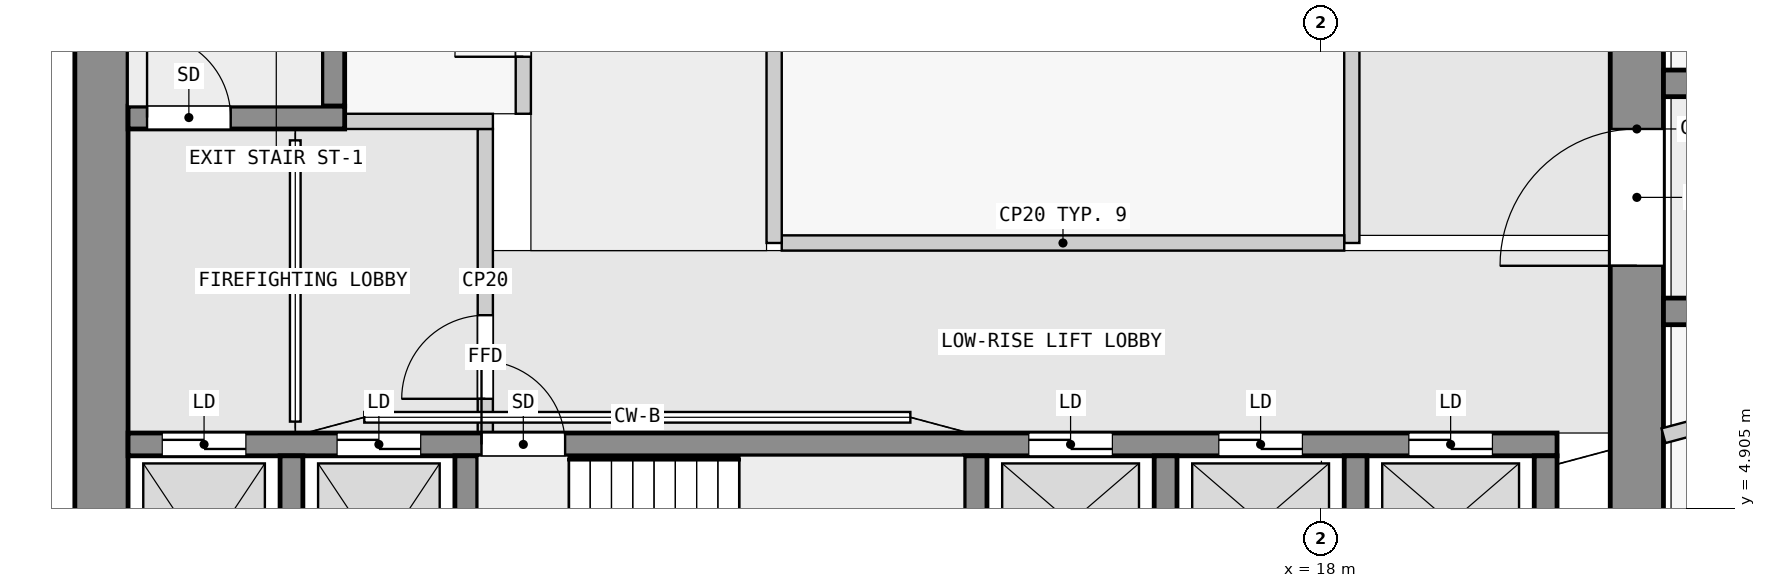
"""IFC4 building model, lengths in metres.
Left out: names, types, materials, properties, quantities, classifications, styles, units other than length and angle.
Written with IfcOpenShell. Run it as: python <this file> out.ifc"""

import sys

from ifc_helpers import new_model, si_unit, direction, frame, frame_2d, origin, place, context, subcontext, project, spatial, rectangle, extrude, element, fill, save


model = new_model("IFC4")
c1 = context("Model", 3, precision=1e-05, world=origin(), true_north=direction((0.0, 1.0)))
c2 = subcontext(c1, "Body", "Model", "MODEL_VIEW")
j1 = project(units=[si_unit("LENGTHUNIT", "METRE"), si_unit("PLANEANGLEUNIT", "RADIAN")], contexts=[c1])
p1 = place(None, origin())
s1 = spatial("IfcSite", under=j1, at=p1, CompositionType="ELEMENT")
p2 = place(p1, origin())
s2 = spatial("IfcBuilding", under=s1, at=p2, CompositionType="ELEMENT")
p3 = place(p2, frame((0.0, 0.0, 72.3)))
s3 = spatial("IfcBuildingStorey", under=s2, at=p3, CompositionType="ELEMENT", Elevation=72.3)
p4 = place(p3, frame((1.95, 2.5, 0.0), z_axis=(0.0, 0.0, 1.0), x_axis=(0.0, 1.0, 0.0)))
e1 = element("IfcWall", 1, at=p4, inside=s3, PredefinedType="SHEAR", context=c2, shape_type="SweptSolid", body=[
    extrude(rectangle(XDim=14.8, YDim=0.7, at=frame_2d((7.4, 0.0))), origin(), (0.0, 0.0, 1.0), 5.75),
])
p5 = place(p3, frame((22.15, 2.5, 0.0), z_axis=(0.0, 0.0, 1.0), x_axis=(0.0, 1.0, 0.0)))
e2 = element("IfcWall", 2, at=p5, inside=s3, PredefinedType="SHEAR", context=c2, shape_type="SweptSolid", body=[
    extrude(rectangle(XDim=14.8, YDim=0.7, at=frame_2d((7.4, 0.0))), origin(), (0.0, 0.0, 1.0), 5.75),
])
p6 = place(p5, frame((5.6, 0.0, 0.0)))
e3 = element("IfcOpeningElement", 3, at=p6, cuts=e2, PredefinedType="OPENING", context=c2, shape_type="SweptSolid", body=[
    extrude(rectangle(XDim=1.8, YDim=2.1, at=frame_2d((0.9, 1.05))), frame((0.0, 0.36, 0.0), z_axis=(0.0, -1.0, 0.0), x_axis=(1.0, 0.0, 0.0)), (0.0, 0.0, 1.0), 0.72),
])
for number, where, z_axis, x_axis in (
    (4, (4.45, 2.8, 0.0), (0.0, 0.0, 1.0), (0.0, 1.0, 0.0)),
    (5, (6.75, 2.8, 0.0), (0.0, 0.0, 1.0), (0.0, 1.0, 0.0)),
    (6, (13.45, 2.8, 0.0), (0.0, 0.0, 1.0), (0.0, 1.0, 0.0)),
    (7, (15.95, 2.8, 0.0), (0.0, 0.0, 1.0), (0.0, 1.0, 0.0)),
    (8, (18.45, 2.8, 0.0), (0.0, 0.0, 1.0), (0.0, 1.0, 0.0)),
    (9, (20.95, 2.8, 0.0), (0.0, 0.0, 1.0), (0.0, 1.0, 0.0)),
):
    element("IfcWall", number, at=place(p3, frame(where, z_axis=z_axis, x_axis=x_axis)), inside=s3, PredefinedType="SHEAR", context=c2, shape_type="SweptSolid", body=[
        extrude(rectangle(XDim=2.8, YDim=0.3, at=frame_2d((1.4, 0.0))), origin(), (0.0, 0.0, 1.0), 5.75),
    ])
p7 = place(p3, frame((2.3, 5.75, 0.0), z_axis=(0.0, 0.0, 1.0), x_axis=(1.0, 0.0, 0.0)))
e10 = element("IfcWall", 10, at=p7, inside=s3, PredefinedType="SHEAR", context=c2, shape_type="SweptSolid", body=[
    extrude(rectangle(XDim=18.8, YDim=0.3, at=frame_2d((9.4, 0.0))), origin(), (0.0, 0.0, 1.0), 5.75),
])
p8 = place(p7, frame((4.65, 0.0, 0.0)))
e11 = element("IfcOpeningElement", 11, at=p8, cuts=e10, PredefinedType="OPENING", context=c2, shape_type="SweptSolid", body=[
    extrude(rectangle(XDim=1.1, YDim=2.1, at=frame_2d((0.55, 1.05))), frame((0.0, 0.16, 0.0), z_axis=(0.0, -1.0, 0.0), x_axis=(1.0, 0.0, 0.0)), (0.0, 0.0, 1.0), 0.32),
])
p9 = place(p7, frame((0.45, 0.0, 0.0)))
e12 = element("IfcOpeningElement", 12, at=p9, cuts=e10, PredefinedType="OPENING", context=c2, shape_type="SweptSolid", body=[
    extrude(rectangle(XDim=1.1, YDim=2.1, at=frame_2d((0.55, 1.05))), frame((0.0, 0.16, 0.0), z_axis=(0.0, -1.0, 0.0), x_axis=(1.0, 0.0, 0.0)), (0.0, 0.0, 1.0), 0.32),
])
p10 = place(p7, frame((2.75, 0.0, 0.0)))
e13 = element("IfcOpeningElement", 13, at=p10, cuts=e10, PredefinedType="OPENING", context=c2, shape_type="SweptSolid", body=[
    extrude(rectangle(XDim=1.1, YDim=2.1, at=frame_2d((0.55, 1.05))), frame((0.0, 0.16, 0.0), z_axis=(0.0, -1.0, 0.0), x_axis=(1.0, 0.0, 0.0)), (0.0, 0.0, 1.0), 0.32),
])
p11 = place(p7, frame((11.85, 0.0, 0.0)))
e14 = element("IfcOpeningElement", 14, at=p11, cuts=e10, PredefinedType="OPENING", context=c2, shape_type="SweptSolid", body=[
    extrude(rectangle(XDim=1.1, YDim=2.1, at=frame_2d((0.55, 1.05))), frame((0.0, 0.16, 0.0), z_axis=(0.0, -1.0, 0.0), x_axis=(1.0, 0.0, 0.0)), (0.0, 0.0, 1.0), 0.32),
])
p12 = place(p7, frame((14.35, 0.0, 0.0)))
e15 = element("IfcOpeningElement", 15, at=p12, cuts=e10, PredefinedType="OPENING", context=c2, shape_type="SweptSolid", body=[
    extrude(rectangle(XDim=1.1, YDim=2.1, at=frame_2d((0.55, 1.05))), frame((0.0, 0.16, 0.0), z_axis=(0.0, -1.0, 0.0), x_axis=(1.0, 0.0, 0.0)), (0.0, 0.0, 1.0), 0.32),
])
p13 = place(p7, frame((16.85, 0.0, 0.0)))
e16 = element("IfcOpeningElement", 16, at=p13, cuts=e10, PredefinedType="OPENING", context=c2, shape_type="SweptSolid", body=[
    extrude(rectangle(XDim=1.1, YDim=2.1, at=frame_2d((0.55, 1.05))), frame((0.0, 0.16, 0.0), z_axis=(0.0, -1.0, 0.0), x_axis=(1.0, 0.0, 0.0)), (0.0, 0.0, 1.0), 0.32),
])
p14 = place(p3, frame((2.3, 10.05, 0.0), z_axis=(0.0, 0.0, 1.0), x_axis=(1.0, 0.0, 0.0)))
e17 = element("IfcWall", 17, at=p14, inside=s3, PredefinedType="SHEAR", context=c2, shape_type="SweptSolid", body=[
    extrude(rectangle(XDim=2.85, YDim=0.3, at=frame_2d((1.425, 0.0))), origin(), (0.0, 0.0, 1.0), 5.75),
])
p15 = place(p14, frame((0.25, 0.0, 0.0)))
e18 = element("IfcOpeningElement", 18, at=p15, cuts=e17, PredefinedType="OPENING", context=c2, shape_type="SweptSolid", body=[
    extrude(rectangle(XDim=1.1, YDim=2.1, at=frame_2d((0.55, 1.05))), frame((0.0, 0.16, 0.0), z_axis=(0.0, -1.0, 0.0), x_axis=(1.0, 0.0, 0.0)), (0.0, 0.0, 1.0), 0.32),
])
p16 = place(p3, frame((5.0, 10.2, 0.0), z_axis=(0.0, 0.0, 1.0), x_axis=(0.0, 1.0, 0.0)))
e19 = element("IfcWall", 19, at=p16, inside=s3, PredefinedType="SHEAR", context=c2, shape_type="SweptSolid", body=[
    extrude(rectangle(XDim=6.4, YDim=0.3, at=frame_2d((3.2, 0.0))), origin(), (0.0, 0.0, 1.0), 5.75),
])
p17 = place(p3, frame((22.5, 7.5, 0.0), z_axis=(0.0, 0.0, 1.0), x_axis=(1.0, 0.0, 0.0)))
e20 = element("IfcWall", 20, at=p17, inside=s3, PredefinedType="SHEAR", context=c2, shape_type="SweptSolid", body=[
    extrude(rectangle(XDim=22.5, YDim=0.35, at=frame_2d((11.25, 0.0))), origin(), (0.0, 0.0, 1.0), 5.75),
])
p18 = place(p17, frame((20.1, 0.0, 0.0)))
e21 = element("IfcOpeningElement", 21, at=p18, cuts=e20, PredefinedType="OPENING", context=c2, shape_type="SweptSolid", body=[
    extrude(rectangle(XDim=1.8, YDim=2.1, at=frame_2d((0.9, 1.05))), frame((0.0, 0.185, 0.0), z_axis=(0.0, -1.0, 0.0), x_axis=(1.0, 0.0, 0.0)), (0.0, 0.0, 1.0), 0.37),
])
p19 = place(p17, frame((15.35, 0.0, 0.0)))
e22 = element("IfcOpeningElement", 22, at=p19, cuts=e20, PredefinedType="OPENING", context=c2, shape_type="SweptSolid", body=[
    extrude(rectangle(XDim=0.9, YDim=2.1, at=frame_2d((0.45, 1.05))), frame((0.0, 0.185, 0.0), z_axis=(0.0, -1.0, 0.0), x_axis=(1.0, 0.0, 0.0)), (0.0, 0.0, 1.0), 0.37),
])
p20 = place(p3, frame((22.5, 10.5, 0.0), z_axis=(0.0, 0.0, 1.0), x_axis=(1.0, 0.0, 0.0)))
e23 = element("IfcWall", 23, at=p20, inside=s3, PredefinedType="SHEAR", context=c2, shape_type="SweptSolid", body=[
    extrude(rectangle(XDim=22.5, YDim=0.35, at=frame_2d((11.25, 0.0))), origin(), (0.0, 0.0, 1.0), 5.75),
])
p21 = place(p20, frame((10.85, 0.0, 0.0)))
e24 = element("IfcOpeningElement", 24, at=p21, cuts=e23, PredefinedType="OPENING", context=c2, shape_type="SweptSolid", body=[
    extrude(rectangle(XDim=0.9, YDim=2.1, at=frame_2d((0.45, 1.05))), frame((0.0, 0.185, 0.0), z_axis=(0.0, -1.0, 0.0), x_axis=(1.0, 0.0, 0.0)), (0.0, 0.0, 1.0), 0.37),
])
p22 = place(p20, frame((15.35, 0.0, 0.0)))
e25 = element("IfcOpeningElement", 25, at=p22, cuts=e23, PredefinedType="OPENING", context=c2, shape_type="SweptSolid", body=[
    extrude(rectangle(XDim=1.0, YDim=2.1, at=frame_2d((0.5, 1.05))), frame((0.0, 0.185, 0.0), z_axis=(0.0, -1.0, 0.0), x_axis=(1.0, 0.0, 0.0)), (0.0, 0.0, 1.0), 0.37),
])
p23 = place(p20, frame((3.6, 0.0, 0.0)))
e26 = element("IfcOpeningElement", 26, at=p23, cuts=e23, PredefinedType="OPENING", context=c2, shape_type="SweptSolid", body=[
    extrude(rectangle(XDim=1.8, YDim=2.1, at=frame_2d((0.9, 1.05))), frame((0.0, 0.185, 0.0), z_axis=(0.0, -1.0, 0.0), x_axis=(1.0, 0.0, 0.0)), (0.0, 0.0, 1.0), 0.37),
])
p24 = place(p3, frame((7.0, 5.9, 0.0), z_axis=(0.0, 0.0, 1.0), x_axis=(0.0, 1.0, 0.0)))
e27 = element("IfcWall", 27, at=p24, inside=s3, PredefinedType="PARTITIONING", context=c2, shape_type="SweptSolid", body=[
    extrude(rectangle(XDim=4.0, YDim=0.2, at=frame_2d((2.0, 0.0))), origin(), (0.0, 0.0, 1.0), 5.75),
])
p25 = place(p24, frame((0.45, 0.0, 0.0)))
e28 = element("IfcOpeningElement", 28, at=p25, cuts=e27, PredefinedType="OPENING", context=c2, shape_type="SweptSolid", body=[
    extrude(rectangle(XDim=1.1, YDim=2.1, at=frame_2d((0.55, 1.05))), frame((0.0, 0.11, 0.0), z_axis=(0.0, -1.0, 0.0), x_axis=(1.0, 0.0, 0.0)), (0.0, 0.0, 1.0), 0.22),
])
p26 = place(p3, frame((5.15, 10.0, 0.0), z_axis=(0.0, 0.0, 1.0), x_axis=(1.0, 0.0, 0.0)))
e29 = element("IfcWall", 29, at=p26, inside=s3, PredefinedType="PARTITIONING", context=c2, shape_type="SweptSolid", body=[
    extrude(rectangle(XDim=1.95, YDim=0.2, at=frame_2d((0.975, 0.0))), origin(), (0.0, 0.0, 1.0), 5.75),
])
p27 = place(p3, frame((10.8, 8.4, 0.0), z_axis=(0.0, 0.0, 1.0), x_axis=(0.0, 1.0, 0.0)))
e30 = element("IfcWall", 30, at=p27, inside=s3, PredefinedType="PARTITIONING", context=c2, shape_type="SweptSolid", body=[
    extrude(rectangle(XDim=6.2, YDim=0.2, at=frame_2d((3.1, 0.0))), origin(), (0.0, 0.0, 1.0), 5.75),
])
p28 = place(p3, frame((10.9, 8.4, 0.0), z_axis=(0.0, 0.0, 1.0), x_axis=(1.0, 0.0, 0.0)))
e31 = element("IfcWall", 31, at=p28, inside=s3, PredefinedType="PARTITIONING", context=c2, shape_type="SweptSolid", body=[
    extrude(rectangle(XDim=7.4, YDim=0.2, at=frame_2d((3.7, 0.0))), origin(), (0.0, 0.0, 1.0), 5.75),
])
p29 = place(p3, frame((18.4, 8.4, 0.0), z_axis=(0.0, 0.0, 1.0), x_axis=(0.0, 1.0, 0.0)))
e32 = element("IfcWall", 32, at=p29, inside=s3, PredefinedType="PARTITIONING", context=c2, shape_type="SweptSolid", body=[
    extrude(rectangle(XDim=6.2, YDim=0.2, at=frame_2d((3.1, 0.0))), origin(), (0.0, 0.0, 1.0), 5.75),
])
p30 = place(p29, frame((3.15, 0.0, 0.0)))
e33 = element("IfcOpeningElement", 33, at=p30, cuts=e32, PredefinedType="OPENING", context=c2, shape_type="SweptSolid", body=[
    extrude(rectangle(XDim=0.9, YDim=2.1, at=frame_2d((0.45, 1.05))), frame((0.0, 0.11, 0.0), z_axis=(0.0, -1.0, 0.0), x_axis=(1.0, 0.0, 0.0)), (0.0, 0.0, 1.0), 0.22),
])
p31 = place(p3, frame((7.5, 10.1, 0.0), z_axis=(0.0, 0.0, 1.0), x_axis=(0.0, 1.0, 0.0)))
e34 = element("IfcWall", 34, at=p31, inside=s3, PredefinedType="PARTITIONING", context=c2, shape_type="SweptSolid", body=[
    extrude(rectangle(XDim=7.2, YDim=0.2, at=frame_2d((3.6, 0.0))), origin(), (0.0, 0.0, 1.0), 5.75),
])
p32 = place(p31, frame((0.75, 0.0, 0.0)))
e35 = element("IfcOpeningElement", 35, at=p32, cuts=e34, PredefinedType="OPENING", context=c2, shape_type="SweptSolid", body=[
    extrude(rectangle(XDim=0.9, YDim=2.1, at=frame_2d((0.45, 1.05))), frame((0.0, 0.11, 0.0), z_axis=(0.0, -1.0, 0.0), x_axis=(1.0, 0.0, 0.0)), (0.0, 0.0, 1.0), 0.22),
])
p33 = place(p31, frame((4.35, 0.0, 0.0)))
e36 = element("IfcOpeningElement", 36, at=p33, cuts=e34, PredefinedType="OPENING", context=c2, shape_type="SweptSolid", body=[
    extrude(rectangle(XDim=0.9, YDim=2.1, at=frame_2d((0.45, 1.05))), frame((0.0, 0.11, 0.0), z_axis=(0.0, -1.0, 0.0), x_axis=(1.0, 0.0, 0.0)), (0.0, 0.0, 1.0), 0.22),
])
p34 = place(p3, frame((22.5, 5.864, 0.0), z_axis=(0.0, 0.0, 1.0), x_axis=(0.96602336302, 0.258454758323, 0.0)))
e37 = element("IfcWall", 37, at=p34, inside=s3, PredefinedType="PARTITIONING", context=c2, shape_type="SweptSolid", body=[
    extrude(rectangle(XDim=0.94, YDim=0.2, at=frame_2d((0.47, 0.0))), origin(), (0.0, 0.0, 1.0), 5.75),
])
p35 = place(p25, origin())
e38 = element("IfcDoor", 38, at=p35, inside=s3, OperationType="SINGLE_SWING_LEFT", PredefinedType="DOOR", context=c2, shape_type="SweptSolid", body=[
    extrude(rectangle(XDim=1.1, YDim=2.1, at=frame_2d((0.55, 1.05))), frame((0.0, 0.025, 0.0), z_axis=(0.0, -1.0, 0.0), x_axis=(1.0, 0.0, 0.0)), (0.0, 0.0, 1.0), 0.05),
])
fill(e28, e38)
p36 = place(p15, origin())
e39 = element("IfcDoor", 39, at=p36, inside=s3, OperationType="SINGLE_SWING_RIGHT", PredefinedType="DOOR", context=c2, shape_type="SweptSolid", body=[
    extrude(rectangle(XDim=1.1, YDim=2.1, at=frame_2d((0.55, 1.05))), frame((0.0, 0.025, 0.0), z_axis=(0.0, -1.0, 0.0), x_axis=(1.0, 0.0, 0.0)), (0.0, 0.0, 1.0), 0.05),
])
fill(e18, e39)
p37 = place(p8, origin())
e40 = element("IfcDoor", 40, at=p37, inside=s3, OperationType="SINGLE_SWING_LEFT", PredefinedType="DOOR", context=c2, shape_type="SweptSolid", body=[
    extrude(rectangle(XDim=1.1, YDim=2.1, at=frame_2d((0.55, 1.05))), frame((0.0, 0.025, 0.0), z_axis=(0.0, -1.0, 0.0), x_axis=(1.0, 0.0, 0.0)), (0.0, 0.0, 1.0), 0.05),
])
fill(e11, e40)
p38 = place(p9, origin())
e41 = element("IfcDoor", 41, at=p38, inside=s3, OperationType="DOUBLE_DOOR_SLIDING", PredefinedType="DOOR", context=c2, shape_type="SweptSolid", body=[
    extrude(rectangle(XDim=1.1, YDim=2.1, at=frame_2d((0.55, 1.05))), frame((0.0, 0.025, 0.0), z_axis=(0.0, -1.0, 0.0), x_axis=(1.0, 0.0, 0.0)), (0.0, 0.0, 1.0), 0.05),
])
fill(e12, e41)
p39 = place(p10, origin())
e42 = element("IfcDoor", 42, at=p39, inside=s3, OperationType="DOUBLE_DOOR_SLIDING", PredefinedType="DOOR", context=c2, shape_type="SweptSolid", body=[
    extrude(rectangle(XDim=1.1, YDim=2.1, at=frame_2d((0.55, 1.05))), frame((0.0, 0.025, 0.0), z_axis=(0.0, -1.0, 0.0), x_axis=(1.0, 0.0, 0.0)), (0.0, 0.0, 1.0), 0.05),
])
fill(e13, e42)
p40 = place(p11, origin())
e43 = element("IfcDoor", 43, at=p40, inside=s3, OperationType="DOUBLE_DOOR_SLIDING", PredefinedType="DOOR", context=c2, shape_type="SweptSolid", body=[
    extrude(rectangle(XDim=1.1, YDim=2.1, at=frame_2d((0.55, 1.05))), frame((0.0, 0.025, 0.0), z_axis=(0.0, -1.0, 0.0), x_axis=(1.0, 0.0, 0.0)), (0.0, 0.0, 1.0), 0.05),
])
fill(e14, e43)
p41 = place(p12, origin())
e44 = element("IfcDoor", 44, at=p41, inside=s3, OperationType="DOUBLE_DOOR_SLIDING", PredefinedType="DOOR", context=c2, shape_type="SweptSolid", body=[
    extrude(rectangle(XDim=1.1, YDim=2.1, at=frame_2d((0.55, 1.05))), frame((0.0, 0.025, 0.0), z_axis=(0.0, -1.0, 0.0), x_axis=(1.0, 0.0, 0.0)), (0.0, 0.0, 1.0), 0.05),
])
fill(e15, e44)
p42 = place(p13, origin())
e45 = element("IfcDoor", 45, at=p42, inside=s3, OperationType="DOUBLE_DOOR_SLIDING", PredefinedType="DOOR", context=c2, shape_type="SweptSolid", body=[
    extrude(rectangle(XDim=1.1, YDim=2.1, at=frame_2d((0.55, 1.05))), frame((0.0, 0.025, 0.0), z_axis=(0.0, -1.0, 0.0), x_axis=(1.0, 0.0, 0.0)), (0.0, 0.0, 1.0), 0.05),
])
fill(e16, e45)
p43 = place(p6, origin())
e46 = element("IfcDoor", 46, at=p43, inside=s3, OperationType="DOUBLE_DOOR_SINGLE_SWING", PredefinedType="DOOR", context=c2, shape_type="SweptSolid", body=[
    extrude(rectangle(XDim=1.8, YDim=2.1, at=frame_2d((0.9, 1.05))), frame((0.0, 0.025, 0.0), z_axis=(0.0, -1.0, 0.0), x_axis=(1.0, 0.0, 0.0)), (0.0, 0.0, 1.0), 0.05),
])
fill(e3, e46)
p44 = place(p32, origin())
e47 = element("IfcDoor", 47, at=p44, inside=s3, OperationType="SINGLE_SWING_RIGHT", PredefinedType="DOOR", context=c2, shape_type="SweptSolid", body=[
    extrude(rectangle(XDim=0.9, YDim=2.1, at=frame_2d((0.45, 1.05))), frame((0.0, 0.025, 0.0), z_axis=(0.0, -1.0, 0.0), x_axis=(1.0, 0.0, 0.0)), (0.0, 0.0, 1.0), 0.05),
])
fill(e35, e47)
save(model, sys.argv[1])
